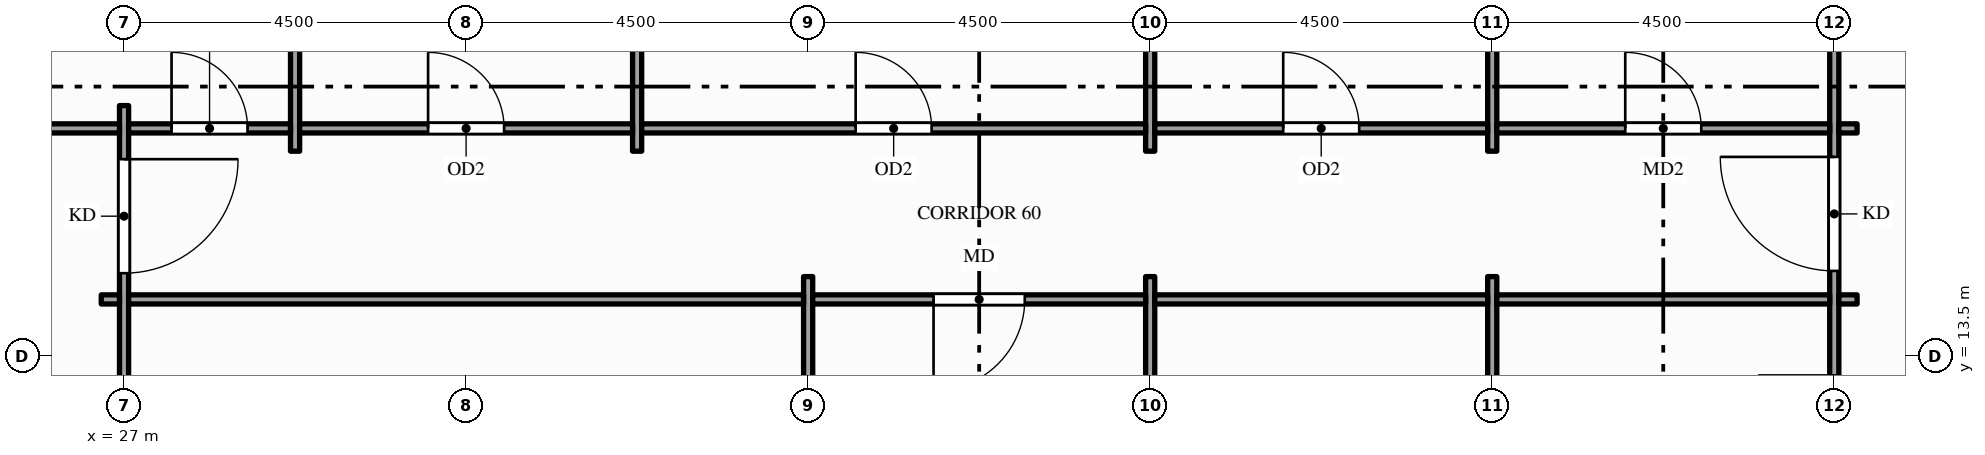
"""IFC4 building model, lengths in metres.
Left out: names, types, materials, properties, quantities, classifications, styles, units other than length and angle.
Written with IfcOpenShell. Run it as: python <this file> out.ifc"""

import sys

from ifc_helpers import new_model, si_unit, direction, frame, frame_2d, origin, place, context, subcontext, project, spatial, rectangle, extrude, element, fill, save


model = new_model("IFC4")
c1 = context("Model", 3, precision=1e-05, world=origin(), true_north=direction((0.0, 1.0)))
c2 = subcontext(c1, "Body", "Model", "MODEL_VIEW")
j1 = project(units=[si_unit("LENGTHUNIT", "METRE"), si_unit("PLANEANGLEUNIT", "RADIAN")], contexts=[c1])
p1 = place(None, origin())
s1 = spatial("IfcSite", under=j1, at=p1, CompositionType="ELEMENT")
p2 = place(p1, origin())
s2 = spatial("IfcBuilding", under=s1, at=p2, CompositionType="ELEMENT")
p3 = place(p2, frame((0.0, 0.0, 195.0)))
s3 = spatial("IfcBuildingStorey", under=s2, at=p3, CompositionType="ELEMENT", Elevation=195.0)
p4 = place(p3, frame((27.0, 2.7, 0.0), z_axis=(0.0, 0.0, 1.0), x_axis=(0.0, 1.0, 0.0)))
e1 = element("IfcWall", 1, at=p4, inside=s3, PredefinedType="PARTITIONING", context=c2, shape_type="SweptSolid", body=[
    extrude(rectangle(XDim=14.1, YDim=0.12, at=frame_2d((7.05, 0.0))), origin(), (0.0, 0.0, 1.0), 2.87),
])
p5 = place(p4, frame((0.705, 0.0, 0.0)))
e2 = element("IfcOpeningElement", 2, at=p5, cuts=e1, PredefinedType="OPENING", context=c2, shape_type="SweptSolid", body=[
    extrude(rectangle(XDim=1.5, YDim=2.1, at=frame_2d((0.75, 1.05))), frame((0.0, 0.07, 0.0), z_axis=(0.0, -1.0, 0.0), x_axis=(1.0, 0.0, 0.0)), (0.0, 0.0, 1.0), 0.14),
])
p6 = place(p4, frame((11.895, 0.0, 0.0)))
e3 = element("IfcOpeningElement", 3, at=p6, cuts=e1, PredefinedType="OPENING", context=c2, shape_type="SweptSolid", body=[
    extrude(rectangle(XDim=1.5, YDim=2.1, at=frame_2d((0.75, 1.05))), frame((0.0, 0.07, 0.0), z_axis=(0.0, -1.0, 0.0), x_axis=(1.0, 0.0, 0.0)), (0.0, 0.0, 1.0), 0.14),
])
for number, where, z_axis, x_axis in (
    (4, (29.25, 16.2, 0.0), (0.0, 0.0, 1.0), (0.0, 1.0, 0.0)),
    (5, (33.75, 16.2, 0.0), (0.0, 0.0, 1.0), (0.0, 1.0, 0.0)),
):
    element("IfcWall", number, at=place(p3, frame(where, z_axis=z_axis, x_axis=x_axis)), inside=s3, PredefinedType="PARTITIONING", context=c2, shape_type="SweptSolid", body=[
        extrude(rectangle(XDim=4.65, YDim=0.12, at=frame_2d((2.325, 0.0))), origin(), (0.0, 0.0, 1.0), 2.87),
    ])
for number, where, z_axis, x_axis in (
    (6, (36.0, 4.95, 0.0), (0.0, 0.0, 1.0), (0.0, 1.0, 0.0)),
    (7, (40.5, 4.95, 0.0), (0.0, 0.0, 1.0), (0.0, 1.0, 0.0)),
):
    element("IfcWall", number, at=place(p3, frame(where, z_axis=z_axis, x_axis=x_axis)), inside=s3, PredefinedType="PARTITIONING", context=c2, shape_type="SweptSolid", body=[
        extrude(rectangle(XDim=9.6, YDim=0.12, at=frame_2d((4.8, 0.0))), origin(), (0.0, 0.0, 1.0), 2.87),
    ])
p7 = place(p3, frame((40.5, 16.2, 0.0), z_axis=(0.0, 0.0, 1.0), x_axis=(0.0, 1.0, 0.0)))
e8 = element("IfcWall", 8, at=p7, inside=s3, PredefinedType="PARTITIONING", context=c2, shape_type="SweptSolid", body=[
    extrude(rectangle(XDim=4.65, YDim=0.12, at=frame_2d((2.325, 0.0))), origin(), (0.0, 0.0, 1.0), 2.87),
])
p8 = place(p3, frame((45.0, 4.95, 0.0), z_axis=(0.0, 0.0, 1.0), x_axis=(0.0, 1.0, 0.0)))
e9 = element("IfcWall", 9, at=p8, inside=s3, PredefinedType="PARTITIONING", context=c2, shape_type="SweptSolid", body=[
    extrude(rectangle(XDim=9.6, YDim=0.12, at=frame_2d((4.8, 0.0))), origin(), (0.0, 0.0, 1.0), 2.87),
])
p9 = place(p3, frame((45.0, 16.2, 0.0), z_axis=(0.0, 0.0, 1.0), x_axis=(0.0, 1.0, 0.0)))
e10 = element("IfcWall", 10, at=p9, inside=s3, PredefinedType="PARTITIONING", context=c2, shape_type="SweptSolid", body=[
    extrude(rectangle(XDim=4.65, YDim=0.12, at=frame_2d((2.325, 0.0))), origin(), (0.0, 0.0, 1.0), 2.87),
])
p10 = place(p3, frame((49.5, -1.35, 0.0), z_axis=(0.0, 0.0, 1.0), x_axis=(0.0, 1.0, 0.0)))
e11 = element("IfcWall", 11, at=p10, inside=s3, PredefinedType="PARTITIONING", context=c2, shape_type="SweptSolid", body=[
    extrude(rectangle(XDim=22.2, YDim=0.12, at=frame_2d((11.1, 0.0))), origin(), (0.0, 0.0, 1.0), 2.87),
])
p11 = place(p10, frame((4.725, 0.0, 0.0)))
e12 = element("IfcOpeningElement", 12, at=p11, cuts=e11, PredefinedType="OPENING", context=c2, shape_type="SweptSolid", body=[
    extrude(rectangle(XDim=1.5, YDim=2.1, at=frame_2d((0.75, 1.05))), frame((0.0, 0.07, 0.0), z_axis=(0.0, -1.0, 0.0), x_axis=(1.0, 0.0, 0.0)), (0.0, 0.0, 1.0), 0.14),
])
p12 = place(p10, frame((15.975, 0.0, 0.0)))
e13 = element("IfcOpeningElement", 13, at=p12, cuts=e11, PredefinedType="OPENING", context=c2, shape_type="SweptSolid", body=[
    extrude(rectangle(XDim=1.5, YDim=2.1, at=frame_2d((0.75, 1.05))), frame((0.0, 0.07, 0.0), z_axis=(0.0, -1.0, 0.0), x_axis=(1.0, 0.0, 0.0)), (0.0, 0.0, 1.0), 0.14),
])
p13 = place(p10, frame((7.6, 0.0, 0.0)))
e14 = element("IfcOpeningElement", 14, at=p13, cuts=e11, PredefinedType="OPENING", context=c2, shape_type="SweptSolid", body=[
    extrude(rectangle(XDim=0.9, YDim=2.1, at=frame_2d((0.45, 1.05))), frame((0.0, 0.07, 0.0), z_axis=(0.0, -1.0, 0.0), x_axis=(1.0, 0.0, 0.0)), (0.0, 0.0, 1.0), 0.14),
])
p14 = place(p10, frame((10.65, 0.0, 0.0)))
e15 = element("IfcOpeningElement", 15, at=p14, cuts=e11, PredefinedType="OPENING", context=c2, shape_type="SweptSolid", body=[
    extrude(rectangle(XDim=0.9, YDim=2.1, at=frame_2d((0.45, 1.05))), frame((0.0, 0.07, 0.0), z_axis=(0.0, -1.0, 0.0), x_axis=(1.0, 0.0, 0.0)), (0.0, 0.0, 1.0), 0.14),
])
p15 = place(p10, frame((13.6, 0.0, 0.0)))
e16 = element("IfcOpeningElement", 16, at=p15, cuts=e11, PredefinedType="OPENING", context=c2, shape_type="SweptSolid", body=[
    extrude(rectangle(XDim=1.0, YDim=2.1, at=frame_2d((0.5, 1.05))), frame((0.0, 0.07, 0.0), z_axis=(0.0, -1.0, 0.0), x_axis=(1.0, 0.0, 0.0)), (0.0, 0.0, 1.0), 0.14),
])
p16 = place(p3, frame((26.7, 14.25, 0.0), z_axis=(0.0, 0.0, 1.0), x_axis=(1.0, 0.0, 0.0)))
e17 = element("IfcWall", 17, at=p16, inside=s3, PredefinedType="PARTITIONING", context=c2, shape_type="SweptSolid", body=[
    extrude(rectangle(XDim=0.24, YDim=0.12, at=frame_2d((0.12, 0.0))), origin(), (0.0, 0.0, 1.0), 2.87),
])
p17 = place(p3, frame((27.06, 14.25, 0.0), z_axis=(0.0, 0.0, 1.0), x_axis=(1.0, 0.0, 0.0)))
e18 = element("IfcWall", 18, at=p17, inside=s3, PredefinedType="PARTITIONING", context=c2, shape_type="SweptSolid", body=[
    extrude(rectangle(XDim=8.88, YDim=0.12, at=frame_2d((4.44, 0.0))), origin(), (0.0, 0.0, 1.0), 2.87),
])
p18 = place(p3, frame((36.06, 14.25, 0.0), z_axis=(0.0, 0.0, 1.0), x_axis=(1.0, 0.0, 0.0)))
e19 = element("IfcWall", 19, at=p18, inside=s3, PredefinedType="PARTITIONING", context=c2, shape_type="SweptSolid", body=[
    extrude(rectangle(XDim=4.38, YDim=0.12, at=frame_2d((2.19, 0.0))), origin(), (0.0, 0.0, 1.0), 2.87),
])
p19 = place(p18, frame((1.59, 0.0, 0.0)))
e20 = element("IfcOpeningElement", 20, at=p19, cuts=e19, PredefinedType="OPENING", context=c2, shape_type="SweptSolid", body=[
    extrude(rectangle(XDim=1.2, YDim=2.1, at=frame_2d((0.6, 1.05))), frame((0.0, 0.07, 0.0), z_axis=(0.0, -1.0, 0.0), x_axis=(1.0, 0.0, 0.0)), (0.0, 0.0, 1.0), 0.14),
])
for number, where, z_axis, x_axis in (
    (21, (40.56, 14.25, 0.0), (0.0, 0.0, 1.0), (1.0, 0.0, 0.0)),
    (22, (45.06, 14.25, 0.0), (0.0, 0.0, 1.0), (1.0, 0.0, 0.0)),
):
    element("IfcWall", number, at=place(p3, frame(where, z_axis=z_axis, x_axis=x_axis)), inside=s3, PredefinedType="PARTITIONING", context=c2, shape_type="SweptSolid", body=[
        extrude(rectangle(XDim=4.38, YDim=0.12, at=frame_2d((2.19, 0.0))), origin(), (0.0, 0.0, 1.0), 2.87),
    ])
p20 = place(p3, frame((49.56, 14.25, 0.0), z_axis=(0.0, 0.0, 1.0), x_axis=(1.0, 0.0, 0.0)))
e23 = element("IfcWall", 23, at=p20, inside=s3, PredefinedType="PARTITIONING", context=c2, shape_type="SweptSolid", body=[
    extrude(rectangle(XDim=0.24, YDim=0.12, at=frame_2d((0.12, 0.0))), origin(), (0.0, 0.0, 1.0), 2.87),
])
p21 = place(p3, frame((24.81, 16.5, 0.0), z_axis=(0.0, 0.0, 1.0), x_axis=(1.0, 0.0, 0.0)))
e24 = element("IfcWall", 24, at=p21, inside=s3, PredefinedType="PARTITIONING", context=c2, shape_type="SweptSolid", body=[
    extrude(rectangle(XDim=2.13, YDim=0.12, at=frame_2d((1.065, 0.0))), origin(), (0.0, 0.0, 1.0), 2.76),
])
p22 = place(p3, frame((27.06, 16.5, 0.0), z_axis=(0.0, 0.0, 1.0), x_axis=(1.0, 0.0, 0.0)))
e25 = element("IfcWall", 25, at=p22, inside=s3, PredefinedType="PARTITIONING", context=c2, shape_type="SweptSolid", body=[
    extrude(rectangle(XDim=2.13, YDim=0.12, at=frame_2d((1.065, 0.0))), origin(), (0.0, 0.0, 1.0), 2.87),
])
p23 = place(p22, frame((0.565, 0.0, 0.0)))
e26 = element("IfcOpeningElement", 26, at=p23, cuts=e25, PredefinedType="OPENING", context=c2, shape_type="SweptSolid", body=[
    extrude(rectangle(XDim=1.0, YDim=2.1, at=frame_2d((0.5, 1.05))), frame((0.0, 0.07, 0.0), z_axis=(0.0, -1.0, 0.0), x_axis=(1.0, 0.0, 0.0)), (0.0, 0.0, 1.0), 0.14),
])
p24 = place(p3, frame((29.31, 16.5, 0.0), z_axis=(0.0, 0.0, 1.0), x_axis=(1.0, 0.0, 0.0)))
e27 = element("IfcWall", 27, at=p24, inside=s3, PredefinedType="PARTITIONING", context=c2, shape_type="SweptSolid", body=[
    extrude(rectangle(XDim=4.38, YDim=0.12, at=frame_2d((2.19, 0.0))), origin(), (0.0, 0.0, 1.0), 2.87),
])
p25 = place(p24, frame((1.69, 0.0, 0.0)))
e28 = element("IfcOpeningElement", 28, at=p25, cuts=e27, PredefinedType="OPENING", context=c2, shape_type="SweptSolid", body=[
    extrude(rectangle(XDim=1.0, YDim=2.1, at=frame_2d((0.5, 1.05))), frame((0.0, 0.07, 0.0), z_axis=(0.0, -1.0, 0.0), x_axis=(1.0, 0.0, 0.0)), (0.0, 0.0, 1.0), 0.14),
])
p26 = place(p3, frame((33.81, 16.5, 0.0), z_axis=(0.0, 0.0, 1.0), x_axis=(1.0, 0.0, 0.0)))
e29 = element("IfcWall", 29, at=p26, inside=s3, PredefinedType="PARTITIONING", context=c2, shape_type="SweptSolid", body=[
    extrude(rectangle(XDim=6.63, YDim=0.12, at=frame_2d((3.315, 0.0))), origin(), (0.0, 0.0, 1.0), 2.87),
])
p27 = place(p26, frame((2.815, 0.0, 0.0)))
e30 = element("IfcOpeningElement", 30, at=p27, cuts=e29, PredefinedType="OPENING", context=c2, shape_type="SweptSolid", body=[
    extrude(rectangle(XDim=1.0, YDim=2.1, at=frame_2d((0.5, 1.05))), frame((0.0, 0.07, 0.0), z_axis=(0.0, -1.0, 0.0), x_axis=(1.0, 0.0, 0.0)), (0.0, 0.0, 1.0), 0.14),
])
p28 = place(p3, frame((40.56, 16.5, 0.0), z_axis=(0.0, 0.0, 1.0), x_axis=(1.0, 0.0, 0.0)))
e31 = element("IfcWall", 31, at=p28, inside=s3, PredefinedType="PARTITIONING", context=c2, shape_type="SweptSolid", body=[
    extrude(rectangle(XDim=4.38, YDim=0.12, at=frame_2d((2.19, 0.0))), origin(), (0.0, 0.0, 1.0), 2.87),
])
p29 = place(p28, frame((1.69, 0.0, 0.0)))
e32 = element("IfcOpeningElement", 32, at=p29, cuts=e31, PredefinedType="OPENING", context=c2, shape_type="SweptSolid", body=[
    extrude(rectangle(XDim=1.0, YDim=2.1, at=frame_2d((0.5, 1.05))), frame((0.0, 0.07, 0.0), z_axis=(0.0, -1.0, 0.0), x_axis=(1.0, 0.0, 0.0)), (0.0, 0.0, 1.0), 0.14),
])
p30 = place(p3, frame((45.06, 16.5, 0.0), z_axis=(0.0, 0.0, 1.0), x_axis=(1.0, 0.0, 0.0)))
e33 = element("IfcWall", 33, at=p30, inside=s3, PredefinedType="PARTITIONING", context=c2, shape_type="SweptSolid", body=[
    extrude(rectangle(XDim=4.38, YDim=0.12, at=frame_2d((2.19, 0.0))), origin(), (0.0, 0.0, 1.0), 2.87),
])
p31 = place(p30, frame((1.69, 0.0, 0.0)))
e34 = element("IfcOpeningElement", 34, at=p31, cuts=e33, PredefinedType="OPENING", context=c2, shape_type="SweptSolid", body=[
    extrude(rectangle(XDim=1.0, YDim=2.1, at=frame_2d((0.5, 1.05))), frame((0.0, 0.07, 0.0), z_axis=(0.0, -1.0, 0.0), x_axis=(1.0, 0.0, 0.0)), (0.0, 0.0, 1.0), 0.14),
])
p32 = place(p3, frame((49.56, 16.5, 0.0), z_axis=(0.0, 0.0, 1.0), x_axis=(1.0, 0.0, 0.0)))
e35 = element("IfcWall", 35, at=p32, inside=s3, PredefinedType="PARTITIONING", context=c2, shape_type="SweptSolid", body=[
    extrude(rectangle(XDim=0.24, YDim=0.12, at=frame_2d((0.12, 0.0))), origin(), (0.0, 0.0, 1.0), 2.87),
])
p33 = place(p6, origin())
e36 = element("IfcDoor", 36, at=p33, inside=s3, OperationType="SINGLE_SWING_RIGHT", PredefinedType="DOOR", context=c2, shape_type="SweptSolid", body=[
    extrude(rectangle(XDim=1.5, YDim=2.1, at=frame_2d((0.75, 1.05))), frame((0.0, 0.025, 0.0), z_axis=(0.0, -1.0, 0.0), x_axis=(1.0, 0.0, 0.0)), (0.0, 0.0, 1.0), 0.05),
])
fill(e3, e36)
p34 = place(p12, origin())
e37 = element("IfcDoor", 37, at=p34, inside=s3, OperationType="SINGLE_SWING_RIGHT", PredefinedType="DOOR", context=c2, shape_type="SweptSolid", body=[
    extrude(rectangle(XDim=1.5, YDim=2.1, at=frame_2d((0.75, 1.05))), frame((0.0, 0.025, 0.0), z_axis=(0.0, -1.0, 0.0), x_axis=(1.0, 0.0, 0.0)), (0.0, 0.0, 1.0), 0.05),
])
fill(e13, e37)
p35 = place(p19, origin())
e38 = element("IfcDoor", 38, at=p35, inside=s3, OperationType="SINGLE_SWING_LEFT", PredefinedType="DOOR", context=c2, shape_type="SweptSolid", body=[
    extrude(rectangle(XDim=1.2, YDim=2.1, at=frame_2d((0.6, 1.05))), frame((0.0, 0.025, 0.0), z_axis=(0.0, -1.0, 0.0), x_axis=(1.0, 0.0, 0.0)), (0.0, 0.0, 1.0), 0.05),
])
fill(e20, e38)
p36 = place(p23, origin())
e39 = element("IfcDoor", 39, at=p36, inside=s3, OperationType="SINGLE_SWING_LEFT", PredefinedType="DOOR", context=c2, shape_type="SweptSolid", body=[
    extrude(rectangle(XDim=1.0, YDim=2.1, at=frame_2d((0.5, 1.05))), frame((0.0, 0.025, 0.0), z_axis=(0.0, -1.0, 0.0), x_axis=(1.0, 0.0, 0.0)), (0.0, 0.0, 1.0), 0.05),
])
fill(e26, e39)
p37 = place(p25, origin())
e40 = element("IfcDoor", 40, at=p37, inside=s3, OperationType="SINGLE_SWING_LEFT", PredefinedType="DOOR", context=c2, shape_type="SweptSolid", body=[
    extrude(rectangle(XDim=1.0, YDim=2.1, at=frame_2d((0.5, 1.05))), frame((0.0, 0.025, 0.0), z_axis=(0.0, -1.0, 0.0), x_axis=(1.0, 0.0, 0.0)), (0.0, 0.0, 1.0), 0.05),
])
fill(e28, e40)
p38 = place(p27, origin())
e41 = element("IfcDoor", 41, at=p38, inside=s3, OperationType="SINGLE_SWING_LEFT", PredefinedType="DOOR", context=c2, shape_type="SweptSolid", body=[
    extrude(rectangle(XDim=1.0, YDim=2.1, at=frame_2d((0.5, 1.05))), frame((0.0, 0.025, 0.0), z_axis=(0.0, -1.0, 0.0), x_axis=(1.0, 0.0, 0.0)), (0.0, 0.0, 1.0), 0.05),
])
fill(e30, e41)
p39 = place(p29, origin())
e42 = element("IfcDoor", 42, at=p39, inside=s3, OperationType="SINGLE_SWING_LEFT", PredefinedType="DOOR", context=c2, shape_type="SweptSolid", body=[
    extrude(rectangle(XDim=1.0, YDim=2.1, at=frame_2d((0.5, 1.05))), frame((0.0, 0.025, 0.0), z_axis=(0.0, -1.0, 0.0), x_axis=(1.0, 0.0, 0.0)), (0.0, 0.0, 1.0), 0.05),
])
fill(e32, e42)
p40 = place(p31, origin())
e43 = element("IfcDoor", 43, at=p40, inside=s3, OperationType="SINGLE_SWING_LEFT", PredefinedType="DOOR", context=c2, shape_type="SweptSolid", body=[
    extrude(rectangle(XDim=1.0, YDim=2.1, at=frame_2d((0.5, 1.05))), frame((0.0, 0.025, 0.0), z_axis=(0.0, -1.0, 0.0), x_axis=(1.0, 0.0, 0.0)), (0.0, 0.0, 1.0), 0.05),
])
fill(e34, e43)
save(model, sys.argv[1])
